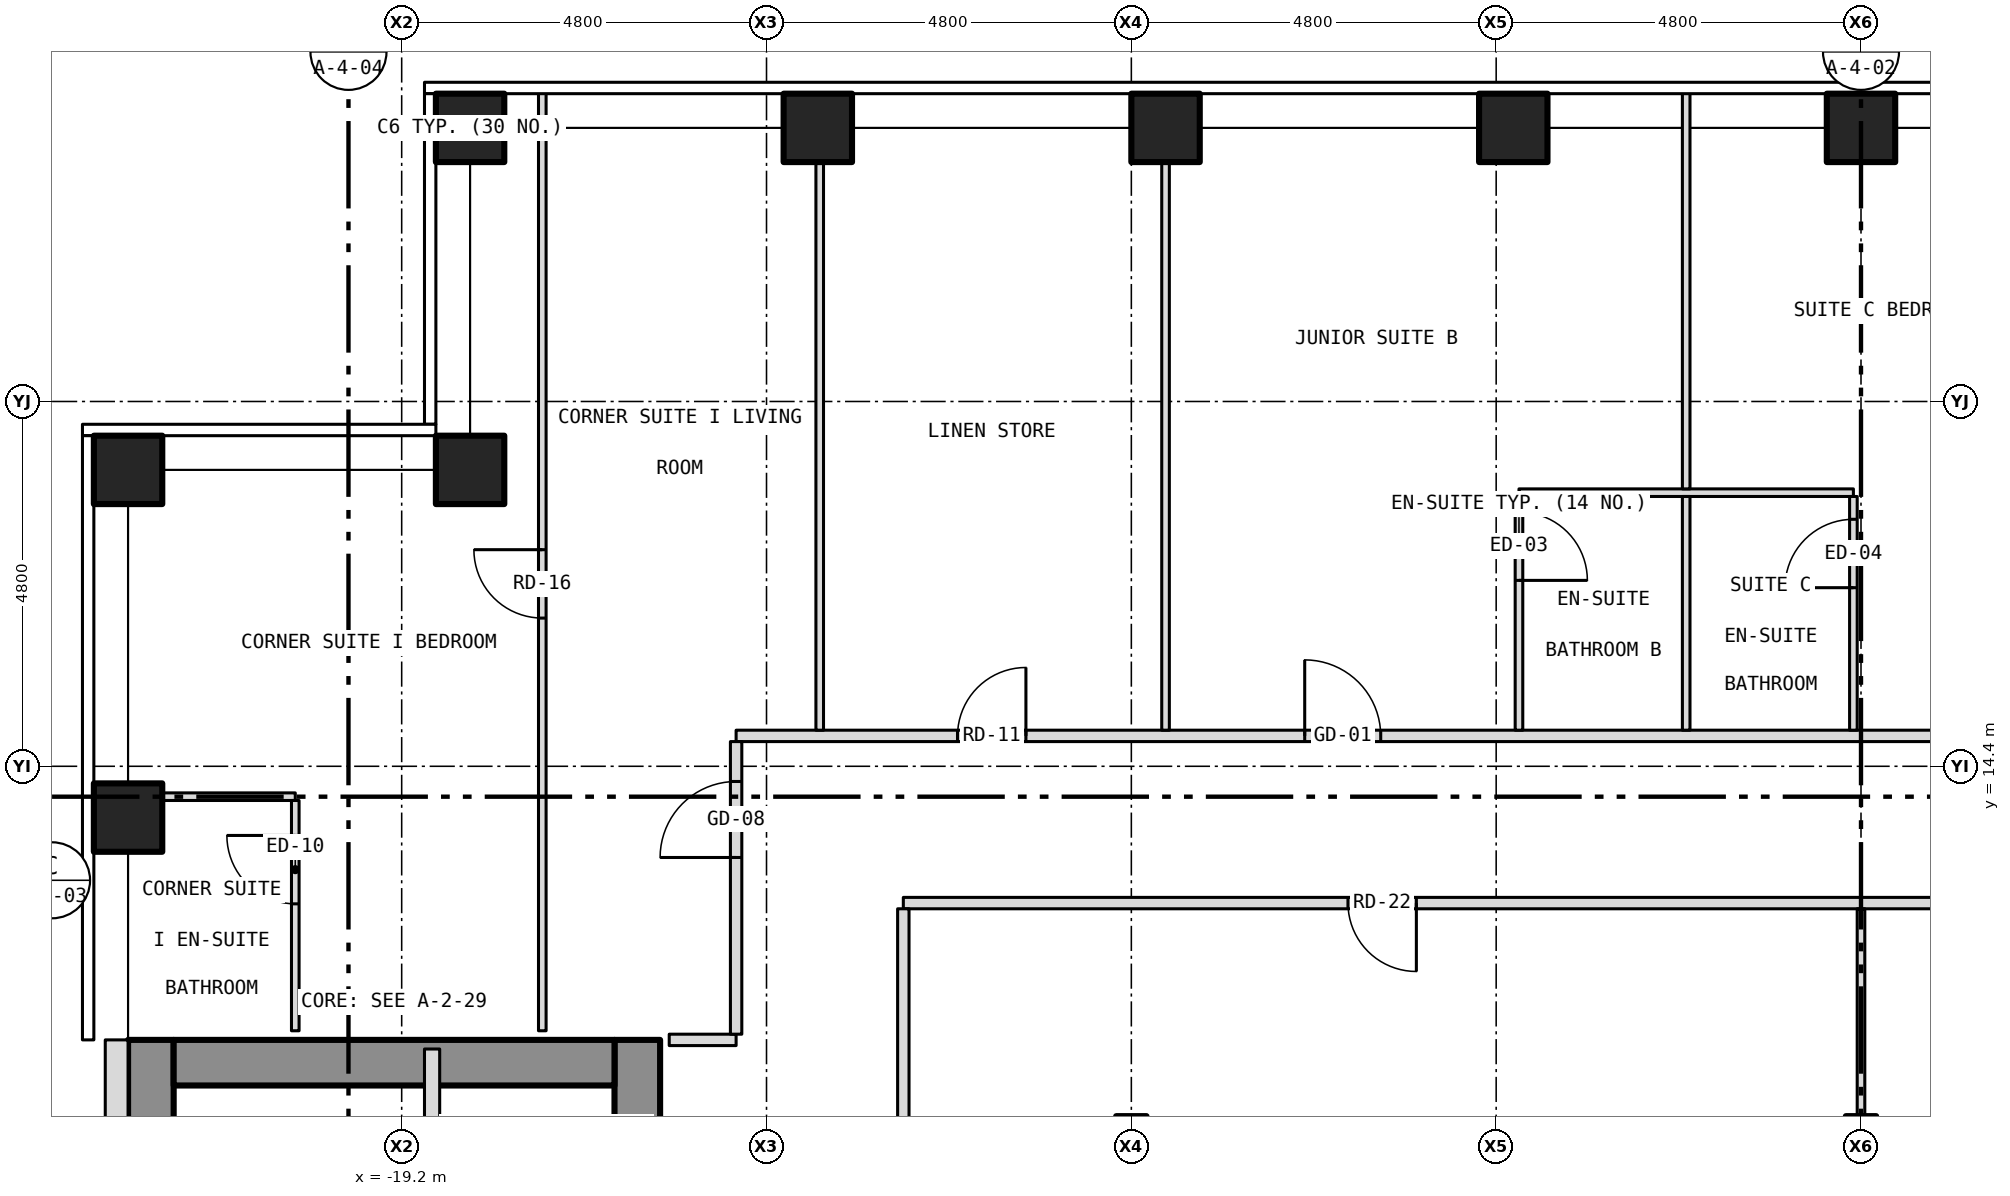
"""IFC4 building model, lengths in metres.
Left out: names, types, materials, properties, quantities, classifications, styles, units other than length and angle.
Written with IfcOpenShell. Run it as: python <this file> out.ifc"""

import sys

from ifc_helpers import new_model, si_unit, direction, frame, frame_2d, origin, origin_2d, place, context, subcontext, project, spatial, rectangle, hollow_rectangle, extrude, element, fill, save


model = new_model("IFC4")
c1 = context("Model", 3, precision=1e-05, world=origin(), true_north=direction((0.0, 1.0)))
c2 = subcontext(c1, "Body", "Model", "MODEL_VIEW")
j1 = project(units=[si_unit("LENGTHUNIT", "METRE"), si_unit("PLANEANGLEUNIT", "RADIAN")], contexts=[c1])
p1 = place(None, origin())
s1 = spatial("IfcSite", under=j1, at=p1, CompositionType="ELEMENT")
p2 = place(p1, origin())
s2 = spatial("IfcBuilding", under=s1, at=p2, CompositionType="ELEMENT")
p3 = place(p2, frame((0.0, 0.0, 106.5)))
s3 = spatial("IfcBuildingStorey", under=s2, at=p3, CompositionType="ELEMENT", Elevation=106.5)
for number, where, z_axis, x_axis in (
    (1, (-18.3, 22.8, -0.15), (0.0, 0.0, 1.0), (1.0, 0.0, 0.0)),
    (2, (-13.725, 22.8, -0.15), (0.0, 0.0, 1.0), (1.0, 0.0, 0.0)),
    (3, (-9.15, 22.8, -0.15), (0.0, 0.0, 1.0), (1.0, 0.0, 0.0)),
    (4, (-4.575, 22.8, -0.15), (0.0, 0.0, 1.0), (1.0, 0.0, 0.0)),
    (5, (0.0, 22.8, -0.15), (0.0, 0.0, 1.0), (1.0, 0.0, 0.0)),
    (6, (-22.8, 13.725, -0.15), (0.0, 0.0, 1.0), (1.0, 0.0, 0.0)),
    (7, (-22.8, 18.3, -0.15), (0.0, 0.0, 1.0), (1.0, 0.0, 0.0)),
    (8, (-18.3, 18.3, -0.15), (0.0, 0.0, 1.0), (1.0, 0.0, 0.0)),
):
    element("IfcColumn", number, at=place(p3, frame(where, z_axis=z_axis, x_axis=x_axis)), inside=s3, PredefinedType="COLUMN", context=c2, shape_type="SweptSolid", body=[
        extrude(hollow_rectangle(XDim=0.9, YDim=0.9, WallThickness=0.05, at=origin_2d()), origin(), (0.0, 0.0, 1.0), 3.5),
    ])
p4 = place(p3, frame((-16.1, -10.8, 0.0), z_axis=(0.0, 0.0, 1.0), x_axis=(0.0, 1.0, 0.0)))
e9 = element("IfcWall", 9, at=p4, inside=s3, PredefinedType="SHEAR", context=c2, shape_type="SweptSolid", body=[
    extrude(rectangle(XDim=21.6, YDim=0.6, at=frame_2d((10.8, 0.0))), origin(), (0.0, 0.0, 1.0), 3.25),
])
p5 = place(p4, frame((9.4, 0.0, 0.0)))
e10 = element("IfcOpeningElement", 10, at=p5, cuts=e9, PredefinedType="OPENING", context=c2, shape_type="SweptSolid", body=[
    extrude(rectangle(XDim=1.1, YDim=2.1, at=frame_2d((0.55, 1.05))), frame((0.0, 0.312, 0.0), z_axis=(0.0, -1.0, 0.0), x_axis=(1.0, 0.0, 0.0)), (0.0, 0.0, 1.0), 0.624),
])
p6 = place(p4, frame((11.5, 0.0, 0.0)))
e11 = element("IfcOpeningElement", 11, at=p6, cuts=e9, PredefinedType="OPENING", context=c2, shape_type="SweptSolid", body=[
    extrude(rectangle(XDim=1.1, YDim=2.1, at=frame_2d((0.55, 1.05))), frame((0.0, 0.312, 0.0), z_axis=(0.0, -1.0, 0.0), x_axis=(1.0, 0.0, 0.0)), (0.0, 0.0, 1.0), 0.624),
])
p7 = place(p4, frame((13.6, 0.0, 0.0)))
e12 = element("IfcOpeningElement", 12, at=p7, cuts=e9, PredefinedType="OPENING", context=c2, shape_type="SweptSolid", body=[
    extrude(rectangle(XDim=1.1, YDim=2.1, at=frame_2d((0.55, 1.05))), frame((0.0, 0.312, 0.0), z_axis=(0.0, -1.0, 0.0), x_axis=(1.0, 0.0, 0.0)), (0.0, 0.0, 1.0), 0.624),
])
p8 = place(p4, frame((15.7, 0.0, 0.0)))
e13 = element("IfcOpeningElement", 13, at=p8, cuts=e9, PredefinedType="OPENING", context=c2, shape_type="SweptSolid", body=[
    extrude(rectangle(XDim=1.1, YDim=2.1, at=frame_2d((0.55, 1.05))), frame((0.0, 0.312, 0.0), z_axis=(0.0, -1.0, 0.0), x_axis=(1.0, 0.0, 0.0)), (0.0, 0.0, 1.0), 0.624),
])
p9 = place(p4, frame((17.8, 0.0, 0.0)))
e14 = element("IfcOpeningElement", 14, at=p9, cuts=e9, PredefinedType="OPENING", context=c2, shape_type="SweptSolid", body=[
    extrude(rectangle(XDim=1.1, YDim=2.1, at=frame_2d((0.55, 1.05))), frame((0.0, 0.312, 0.0), z_axis=(0.0, -1.0, 0.0), x_axis=(1.0, 0.0, 0.0)), (0.0, 0.0, 1.0), 0.624),
])
p10 = place(p4, frame((0.758, 0.0, 0.0)))
e15 = element("IfcOpeningElement", 15, at=p10, cuts=e9, PredefinedType="OPENING", context=c2, shape_type="SweptSolid", body=[
    extrude(rectangle(XDim=1.1, YDim=2.1, at=frame_2d((0.55, 1.05))), frame((0.0, 0.312, 0.0), z_axis=(0.0, -1.0, 0.0), x_axis=(1.0, 0.0, 0.0)), (0.0, 0.0, 1.0), 0.624),
])
p11 = place(p4, frame((7.5, 0.0, 0.0)))
e16 = element("IfcOpeningElement", 16, at=p11, cuts=e9, PredefinedType="OPENING", context=c2, shape_type="SweptSolid", body=[
    extrude(rectangle(XDim=1.1, YDim=2.1, at=frame_2d((0.55, 1.05))), frame((0.0, 0.312, 0.0), z_axis=(0.0, -1.0, 0.0), x_axis=(1.0, 0.0, 0.0)), (0.0, 0.0, 1.0), 0.624),
])
p12 = place(p3, frame((-22.5, -10.8, 0.0), z_axis=(0.0, 0.0, 1.0), x_axis=(0.0, 1.0, 0.0)))
e17 = element("IfcWall", 17, at=p12, inside=s3, PredefinedType="SHEAR", context=c2, shape_type="SweptSolid", body=[
    extrude(rectangle(XDim=21.6, YDim=0.6, at=frame_2d((10.8, 0.0))), origin(), (0.0, 0.0, 1.0), 3.25),
])
p13 = place(p3, frame((-22.2, 10.5, 0.0), z_axis=(0.0, 0.0, 1.0), x_axis=(1.0, 0.0, 0.0)))
e18 = element("IfcWall", 18, at=p13, inside=s3, PredefinedType="SHEAR", context=c2, shape_type="SweptSolid", body=[
    extrude(rectangle(XDim=5.8, YDim=0.6, at=frame_2d((2.9, 0.0))), origin(), (0.0, 0.0, 1.0), 3.25),
])
p14 = place(p3, frame((-22.95, 10.8, 0.0), z_axis=(0.0, 0.0, 1.0), x_axis=(0.0, -1.0, 0.0)))
e19 = element("IfcWall", 19, at=p14, inside=s3, PredefinedType="SOLIDWALL", context=c2, shape_type="SweptSolid", body=[
    extrude(rectangle(XDim=21.6, YDim=0.3, at=frame_2d((10.8, 0.0))), origin(), (0.0, 0.0, 1.0), 3.5),
])
p15 = place(p14, frame((18.05, 0.0, 1.0)))
e20 = element("IfcOpeningElement", 20, at=p15, cuts=e19, PredefinedType="OPENING", context=c2, shape_type="SweptSolid", body=[
    extrude(rectangle(XDim=0.6, YDim=1.5, at=frame_2d((0.3, 0.75))), frame((0.0, 0.162, 0.0), z_axis=(0.0, -1.0, 0.0), x_axis=(1.0, 0.0, 0.0)), (0.0, 0.0, 1.0), 0.324),
])
p16 = place(p3, frame((-15.68, 10.8, 0.0), z_axis=(0.0, 0.0, 1.0), x_axis=(1.0, 0.0, 0.0)))
e21 = element("IfcWall", 21, at=p16, inside=s3, PredefinedType="PARTITIONING", context=c2, shape_type="SweptSolid", body=[
    extrude(rectangle(XDim=0.88, YDim=0.15, at=frame_2d((0.44, 0.0))), origin(), (0.0, 0.0, 1.0), 3.35),
])
p17 = place(p3, frame((-12.6, 12.6, 0.0), z_axis=(0.0, 0.0, 1.0), x_axis=(1.0, 0.0, 0.0)))
e22 = element("IfcWall", 22, at=p17, inside=s3, PredefinedType="PARTITIONING", context=c2, shape_type="SweptSolid", body=[
    extrude(rectangle(XDim=16.7, YDim=0.15, at=frame_2d((8.35, 0.0))), origin(), (0.0, 0.0, 1.0), 3.35),
])
p18 = place(p17, frame((14.2, 0.0, 0.0)))
e23 = element("IfcOpeningElement", 23, at=p18, cuts=e22, PredefinedType="OPENING", context=c2, shape_type="SweptSolid", body=[
    extrude(rectangle(XDim=0.9, YDim=2.1, at=frame_2d((0.45, 1.05))), frame((0.0, 0.087, 0.0), z_axis=(0.0, -1.0, 0.0), x_axis=(1.0, 0.0, 0.0)), (0.0, 0.0, 1.0), 0.174),
])
p19 = place(p17, frame((5.85, 0.0, 0.0)))
e24 = element("IfcOpeningElement", 24, at=p19, cuts=e22, PredefinedType="OPENING", context=c2, shape_type="SweptSolid", body=[
    extrude(rectangle(XDim=0.9, YDim=2.1, at=frame_2d((0.45, 1.05))), frame((0.0, 0.087, 0.0), z_axis=(0.0, -1.0, 0.0), x_axis=(1.0, 0.0, 0.0)), (0.0, 0.0, 1.0), 0.174),
])
p20 = place(p3, frame((-22.68, 14.0, 0.0), z_axis=(0.0, 0.0, 1.0), x_axis=(1.0, 0.0, 0.0)))
e25 = element("IfcWall", 25, at=p20, inside=s3, PredefinedType="PARTITIONING", context=c2, shape_type="SweptSolid", body=[
    extrude(rectangle(XDim=2.08, YDim=0.1, at=frame_2d((1.04, 0.0))), origin(), (0.0, 0.0, 1.0), 3.35),
])
p21 = place(p3, frame((-14.8, 14.8, 0.0), z_axis=(0.0, 0.0, 1.0), x_axis=(1.0, 0.0, 0.0)))
e26 = element("IfcWall", 26, at=p21, inside=s3, PredefinedType="PARTITIONING", context=c2, shape_type="SweptSolid", body=[
    extrude(rectangle(XDim=29.6, YDim=0.15, at=frame_2d((14.8, 0.0))), origin(), (0.0, 0.0, 1.0), 3.35),
])
p22 = place(p21, frame((2.913, 0.0, 0.0)))
e27 = element("IfcOpeningElement", 27, at=p22, cuts=e26, PredefinedType="OPENING", context=c2, shape_type="SweptSolid", body=[
    extrude(rectangle(XDim=0.9, YDim=2.1, at=frame_2d((0.45, 1.05))), frame((0.0, 0.087, 0.0), z_axis=(0.0, -1.0, 0.0), x_axis=(1.0, 0.0, 0.0)), (0.0, 0.0, 1.0), 0.174),
])
p23 = place(p21, frame((7.481, 0.0, 0.0)))
e28 = element("IfcOpeningElement", 28, at=p23, cuts=e26, PredefinedType="OPENING", context=c2, shape_type="SweptSolid", body=[
    extrude(rectangle(XDim=1.0, YDim=2.1, at=frame_2d((0.5, 1.05))), frame((0.0, 0.087, 0.0), z_axis=(0.0, -1.0, 0.0), x_axis=(1.0, 0.0, 0.0)), (0.0, 0.0, 1.0), 0.174),
])
p24 = place(p21, frame((19.104, 0.0, 0.0)))
e29 = element("IfcOpeningElement", 29, at=p24, cuts=e26, PredefinedType="OPENING", context=c2, shape_type="SweptSolid", body=[
    extrude(rectangle(XDim=1.0, YDim=2.1, at=frame_2d((0.5, 1.05))), frame((0.0, 0.087, 0.0), z_axis=(0.0, -1.0, 0.0), x_axis=(1.0, 0.0, 0.0)), (0.0, 0.0, 1.0), 0.174),
])
p25 = place(p21, frame((23.494, 0.0, 0.0)))
e30 = element("IfcOpeningElement", 30, at=p25, cuts=e26, PredefinedType="OPENING", context=c2, shape_type="SweptSolid", body=[
    extrude(rectangle(XDim=1.0, YDim=2.1, at=frame_2d((0.5, 1.05))), frame((0.0, 0.087, 0.0), z_axis=(0.0, -1.0, 0.0), x_axis=(1.0, 0.0, 0.0)), (0.0, 0.0, 1.0), 0.174),
])
p26 = place(p3, frame((-4.5, 18.0, 0.0), z_axis=(0.0, 0.0, 1.0), x_axis=(1.0, 0.0, 0.0)))
e31 = element("IfcWall", 31, at=p26, inside=s3, PredefinedType="PARTITIONING", context=c2, shape_type="SweptSolid", body=[
    extrude(rectangle(XDim=4.4, YDim=0.1, at=frame_2d((2.2, 0.0))), origin(), (0.0, 0.0, 1.0), 3.35),
])
p27 = place(p3, frame((-20.6, 10.92, 0.0), z_axis=(0.0, 0.0, 1.0), x_axis=(0.0, 1.0, 0.0)))
e32 = element("IfcWall", 32, at=p27, inside=s3, PredefinedType="PARTITIONING", context=c2, shape_type="SweptSolid", body=[
    extrude(rectangle(XDim=3.03, YDim=0.1, at=frame_2d((1.515, 0.0))), origin(), (0.0, 0.0, 1.0), 3.35),
])
p28 = place(p27, frame((1.67, 0.0, 0.0)))
e33 = element("IfcOpeningElement", 33, at=p28, cuts=e32, PredefinedType="OPENING", context=c2, shape_type="SweptSolid", body=[
    extrude(rectangle(XDim=0.9, YDim=2.1, at=frame_2d((0.45, 1.05))), frame((0.0, 0.062, 0.0), z_axis=(0.0, -1.0, 0.0), x_axis=(1.0, 0.0, 0.0)), (0.0, 0.0, 1.0), 0.124),
])
p29 = place(p3, frame((-18.8, -1.8, 0.0), z_axis=(0.0, 0.0, 1.0), x_axis=(0.0, 1.0, 0.0)))
e34 = element("IfcWall", 34, at=p29, inside=s3, PredefinedType="PARTITIONING", context=c2, shape_type="SweptSolid", body=[
    extrude(rectangle(XDim=12.48, YDim=0.2, at=frame_2d((6.24, 0.0))), origin(), (0.0, 0.0, 1.0), 3.25),
])
p30 = place(p3, frame((-17.35, 10.92, 0.0), z_axis=(0.0, 0.0, 1.0), x_axis=(0.0, 1.0, 0.0)))
e35 = element("IfcWall", 35, at=p30, inside=s3, PredefinedType="PARTITIONING", context=c2, shape_type="SweptSolid", body=[
    extrude(rectangle(XDim=12.36, YDim=0.1, at=frame_2d((6.18, 0.0))), origin(), (0.0, 0.0, 1.0), 3.35),
])
p31 = place(p30, frame((5.43, 0.0, 0.0)))
e36 = element("IfcOpeningElement", 36, at=p31, cuts=e35, PredefinedType="OPENING", context=c2, shape_type="SweptSolid", body=[
    extrude(rectangle(XDim=0.9, YDim=2.1, at=frame_2d((0.45, 1.05))), frame((0.0, 0.062, 0.0), z_axis=(0.0, -1.0, 0.0), x_axis=(1.0, 0.0, 0.0)), (0.0, 0.0, 1.0), 0.124),
])
p32 = place(p3, frame((-14.8, 10.875, 0.0), z_axis=(0.0, 0.0, 1.0), x_axis=(0.0, 1.0, 0.0)))
e37 = element("IfcWall", 37, at=p32, inside=s3, PredefinedType="PARTITIONING", context=c2, shape_type="SweptSolid", body=[
    extrude(rectangle(XDim=3.85, YDim=0.15, at=frame_2d((1.925, 0.0))), origin(), (0.0, 0.0, 1.0), 3.35),
])
p33 = place(p32, frame((2.325, 0.0, 0.0)))
e38 = element("IfcOpeningElement", 38, at=p33, cuts=e37, PredefinedType="OPENING", context=c2, shape_type="SweptSolid", body=[
    extrude(rectangle(XDim=1.0, YDim=2.1, at=frame_2d((0.5, 1.05))), frame((0.0, 0.087, 0.0), z_axis=(0.0, -1.0, 0.0), x_axis=(1.0, 0.0, 0.0)), (0.0, 0.0, 1.0), 0.174),
])
p34 = place(p3, frame((-13.7, 14.875, 0.0), z_axis=(0.0, 0.0, 1.0), x_axis=(0.0, 1.0, 0.0)))
e39 = element("IfcWall", 39, at=p34, inside=s3, PredefinedType="PARTITIONING", context=c2, shape_type="SweptSolid", body=[
    extrude(rectangle(XDim=7.805, YDim=0.1, at=frame_2d((3.902, 0.0))), origin(), (0.0, 0.0, 1.0), 3.35),
])
p35 = place(p3, frame((-12.6, 4.875, 0.0), z_axis=(0.0, 0.0, 1.0), x_axis=(0.0, 1.0, 0.0)))
e40 = element("IfcWall", 40, at=p35, inside=s3, PredefinedType="PARTITIONING", context=c2, shape_type="SweptSolid", body=[
    extrude(rectangle(XDim=7.65, YDim=0.15, at=frame_2d((3.825, 0.0))), origin(), (0.0, 0.0, 1.0), 3.35),
])
p36 = place(p3, frame((-9.15, 14.875, 0.0), z_axis=(0.0, 0.0, 1.0), x_axis=(0.0, 1.0, 0.0)))
e41 = element("IfcWall", 41, at=p36, inside=s3, PredefinedType="PARTITIONING", context=c2, shape_type="SweptSolid", body=[
    extrude(rectangle(XDim=7.805, YDim=0.1, at=frame_2d((3.902, 0.0))), origin(), (0.0, 0.0, 1.0), 3.35),
])
p37 = place(p3, frame((-4.5, 14.875, 0.0), z_axis=(0.0, 0.0, 1.0), x_axis=(0.0, 1.0, 0.0)))
e42 = element("IfcWall", 42, at=p37, inside=s3, PredefinedType="PARTITIONING", context=c2, shape_type="SweptSolid", body=[
    extrude(rectangle(XDim=3.075, YDim=0.1, at=frame_2d((1.538, 0.0))), origin(), (0.0, 0.0, 1.0), 3.35),
])
p38 = place(p37, frame((1.971, 0.0, 0.0)))
e43 = element("IfcOpeningElement", 43, at=p38, cuts=e42, PredefinedType="OPENING", context=c2, shape_type="SweptSolid", body=[
    extrude(rectangle(XDim=0.9, YDim=2.1, at=frame_2d((0.45, 1.05))), frame((0.0, 0.062, 0.0), z_axis=(0.0, -1.0, 0.0), x_axis=(1.0, 0.0, 0.0)), (0.0, 0.0, 1.0), 0.124),
])
p39 = place(p3, frame((-2.3, 14.875, 0.0), z_axis=(0.0, 0.0, 1.0), x_axis=(0.0, 1.0, 0.0)))
e44 = element("IfcWall", 44, at=p39, inside=s3, PredefinedType="PARTITIONING", context=c2, shape_type="SweptSolid", body=[
    extrude(rectangle(XDim=3.075, YDim=0.1, at=frame_2d((1.538, 0.0))), origin(), (0.0, 0.0, 1.0), 3.35),
])
p40 = place(p3, frame((-2.3, 18.05, 0.0), z_axis=(0.0, 0.0, 1.0), x_axis=(0.0, 1.0, 0.0)))
e45 = element("IfcWall", 45, at=p40, inside=s3, PredefinedType="PARTITIONING", context=c2, shape_type="SweptSolid", body=[
    extrude(rectangle(XDim=5.23, YDim=0.1, at=frame_2d((2.615, 0.0))), origin(), (0.0, 0.0, 1.0), 3.35),
])
p41 = place(p3, frame((-0.1, 14.875, 0.0), z_axis=(0.0, 0.0, 1.0), x_axis=(0.0, 1.0, 0.0)))
e46 = element("IfcWall", 46, at=p41, inside=s3, PredefinedType="PARTITIONING", context=c2, shape_type="SweptSolid", body=[
    extrude(rectangle(XDim=3.075, YDim=0.1, at=frame_2d((1.538, 0.0))), origin(), (0.0, 0.0, 1.0), 2.728),
])
p42 = place(p41, frame((1.875, 0.0, 0.0)))
e47 = element("IfcOpeningElement", 47, at=p42, cuts=e46, PredefinedType="OPENING", context=c2, shape_type="SweptSolid", body=[
    extrude(rectangle(XDim=0.9, YDim=2.1, at=frame_2d((0.45, 1.05))), frame((0.0, 0.062, 0.0), z_axis=(0.0, -1.0, 0.0), x_axis=(1.0, 0.0, 0.0)), (0.0, 0.0, 1.0), 0.124),
])
p43 = place(p3, frame((0.0, 9.799, 0.0), z_axis=(0.0, 0.0, 1.0), x_axis=(0.0, 1.0, 0.0)))
e48 = element("IfcWall", 48, at=p43, inside=s3, PredefinedType="PARTITIONING", context=c2, shape_type="SweptSolid", body=[
    extrude(rectangle(XDim=2.726, YDim=0.1, at=frame_2d((1.363, 0.0))), origin(), (0.0, 0.0, 1.0), 2.728),
])
p44 = place(p22, origin())
e49 = element("IfcDoor", 49, at=p44, inside=s3, OperationType="SINGLE_SWING_RIGHT", PredefinedType="DOOR", context=c2, shape_type="SweptSolid", body=[
    extrude(rectangle(XDim=0.9, YDim=2.1, at=frame_2d((0.45, 1.05))), frame((0.0, 0.025, 0.0), z_axis=(0.0, -1.0, 0.0), x_axis=(1.0, 0.0, 0.0)), (0.0, 0.0, 1.0), 0.05),
])
fill(e27, e49)
p45 = place(p23, origin())
e50 = element("IfcDoor", 50, at=p45, inside=s3, OperationType="SINGLE_SWING_LEFT", PredefinedType="DOOR", context=c2, shape_type="SweptSolid", body=[
    extrude(rectangle(XDim=1.0, YDim=2.1, at=frame_2d((0.5, 1.05))), frame((0.0, 0.025, 0.0), z_axis=(0.0, -1.0, 0.0), x_axis=(1.0, 0.0, 0.0)), (0.0, 0.0, 1.0), 0.05),
])
fill(e28, e50)
p46 = place(p38, origin())
e51 = element("IfcDoor", 51, at=p46, inside=s3, OperationType="SINGLE_SWING_LEFT", PredefinedType="DOOR", context=c2, shape_type="SweptSolid", body=[
    extrude(rectangle(XDim=0.9, YDim=2.1, at=frame_2d((0.45, 1.05))), frame((0.0, 0.025, 0.0), z_axis=(0.0, -1.0, 0.0), x_axis=(1.0, 0.0, 0.0)), (0.0, 0.0, 1.0), 0.05),
])
fill(e43, e51)
p47 = place(p42, origin())
e52 = element("IfcDoor", 52, at=p47, inside=s3, OperationType="SINGLE_SWING_LEFT", PredefinedType="DOOR", context=c2, shape_type="SweptSolid", body=[
    extrude(rectangle(XDim=0.9, YDim=2.1, at=frame_2d((0.45, 1.05))), frame((0.0, 0.025, 0.0), z_axis=(0.0, -1.0, 0.0), x_axis=(1.0, 0.0, 0.0)), (0.0, 0.0, 1.0), 0.05),
])
fill(e47, e52)
p48 = place(p33, origin())
e53 = element("IfcDoor", 53, at=p48, inside=s3, OperationType="SINGLE_SWING_LEFT", PredefinedType="DOOR", context=c2, shape_type="SweptSolid", body=[
    extrude(rectangle(XDim=1.0, YDim=2.1, at=frame_2d((0.5, 1.05))), frame((0.0, 0.025, 0.0), z_axis=(0.0, -1.0, 0.0), x_axis=(1.0, 0.0, 0.0)), (0.0, 0.0, 1.0), 0.05),
])
fill(e38, e53)
p49 = place(p31, origin())
e54 = element("IfcDoor", 54, at=p49, inside=s3, OperationType="SINGLE_SWING_RIGHT", PredefinedType="DOOR", context=c2, shape_type="SweptSolid", body=[
    extrude(rectangle(XDim=0.9, YDim=2.1, at=frame_2d((0.45, 1.05))), frame((0.0, 0.025, 0.0), z_axis=(0.0, -1.0, 0.0), x_axis=(1.0, 0.0, 0.0)), (0.0, 0.0, 1.0), 0.05),
])
fill(e36, e54)
p50 = place(p28, origin())
e55 = element("IfcDoor", 55, at=p50, inside=s3, OperationType="SINGLE_SWING_RIGHT", PredefinedType="DOOR", context=c2, shape_type="SweptSolid", body=[
    extrude(rectangle(XDim=0.9, YDim=2.1, at=frame_2d((0.45, 1.05))), frame((0.0, 0.025, 0.0), z_axis=(0.0, -1.0, 0.0), x_axis=(1.0, 0.0, 0.0)), (0.0, 0.0, 1.0), 0.05),
])
fill(e33, e55)
p51 = place(p19, origin())
e56 = element("IfcDoor", 56, at=p51, inside=s3, OperationType="SINGLE_SWING_RIGHT", PredefinedType="DOOR", context=c2, shape_type="SweptSolid", body=[
    extrude(rectangle(XDim=0.9, YDim=2.1, at=frame_2d((0.45, 1.05))), frame((0.0, 0.025, 0.0), z_axis=(0.0, -1.0, 0.0), x_axis=(1.0, 0.0, 0.0)), (0.0, 0.0, 1.0), 0.05),
])
fill(e24, e56)
save(model, sys.argv[1])
